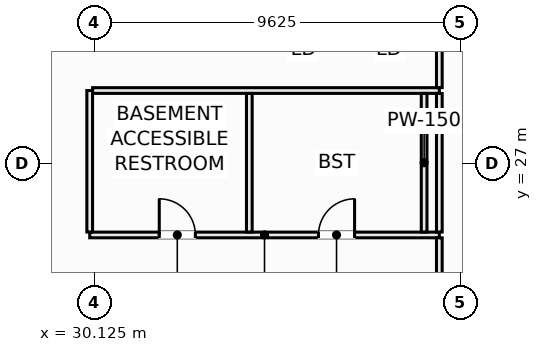
"""IFC4 building model, lengths in metres.
Left out: names, types, materials, properties, quantities, classifications, styles, units other than length and angle.
Written with IfcOpenShell. Run it as: python <this file> out.ifc"""

import sys

from ifc_helpers import new_model, si_unit, direction, frame, frame_2d, origin, place, context, subcontext, project, spatial, rectangle, extrude, element, fill, save


model = new_model("IFC4")
c1 = context("Model", 3, precision=1e-05, world=origin(), true_north=direction((0.0, 1.0)))
c2 = subcontext(c1, "Body", "Model", "MODEL_VIEW")
j1 = project(units=[si_unit("LENGTHUNIT", "METRE"), si_unit("PLANEANGLEUNIT", "RADIAN")], contexts=[c1])
p1 = place(None, origin())
s1 = spatial("IfcSite", under=j1, at=p1, CompositionType="ELEMENT")
p2 = place(p1, origin())
s2 = spatial("IfcBuilding", under=s1, at=p2, CompositionType="ELEMENT")
p3 = place(p2, frame((0.0, 0.0, -4.5)))
s3 = spatial("IfcBuildingStorey", under=s2, at=p3, CompositionType="ELEMENT", Elevation=-4.5)
p4 = place(p3, frame((30.0, 25.12, 0.0), z_axis=(0.0, 0.0, 1.0), x_axis=(1.0, 0.0, 0.0)))
e1 = element("IfcWall", 1, at=p4, inside=s3, PredefinedType="PARTITIONING", context=c2, shape_type="SweptSolid", body=[
    extrude(rectangle(XDim=9.2, YDim=0.15, at=frame_2d((4.6, 0.0))), origin(), (0.0, 0.0, 1.0), 4.14),
])
p5 = place(p4, frame((1.83, 0.0, 0.0)))
e2 = element("IfcOpeningElement", 2, at=p5, cuts=e1, PredefinedType="OPENING", context=c2, shape_type="SweptSolid", body=[
    extrude(rectangle(XDim=0.95, YDim=2.1, at=frame_2d((0.475, 1.05))), frame((0.0, 0.085, 0.0), z_axis=(0.0, -1.0, 0.0), x_axis=(1.0, 0.0, 0.0)), (0.0, 0.0, 1.0), 0.17),
])
p6 = place(p4, frame((6.02, 0.0, 0.0)))
e3 = element("IfcOpeningElement", 3, at=p6, cuts=e1, PredefinedType="OPENING", context=c2, shape_type="SweptSolid", body=[
    extrude(rectangle(XDim=0.95, YDim=2.1, at=frame_2d((0.475, 1.05))), frame((0.0, 0.085, 0.0), z_axis=(0.0, -1.0, 0.0), x_axis=(1.0, 0.0, 0.0)), (0.0, 0.0, 1.0), 0.17),
])
p7 = place(p3, frame((30.0, 25.197, 0.0), z_axis=(0.0, 0.0, 1.0), x_axis=(0.0, 1.0, 0.0)))
e4 = element("IfcWall", 4, at=p7, inside=s3, PredefinedType="PARTITIONING", context=c2, shape_type="SweptSolid", body=[
    extrude(rectangle(XDim=3.723, YDim=0.15, at=frame_2d((1.861, 0.0))), origin(), (0.0, 0.0, 1.0), 4.14),
])
p8 = place(p3, frame((30.077, 28.92, 0.0), z_axis=(0.0, 0.0, 1.0), x_axis=(1.0, 0.0, 0.0)))
e5 = element("IfcWall", 5, at=p8, inside=s3, PredefinedType="PARTITIONING", context=c2, shape_type="SweptSolid", body=[
    extrude(rectangle(XDim=9.123, YDim=0.15, at=frame_2d((4.562, 0.0))), origin(), (0.0, 0.0, 1.0), 4.14),
])
for number, where, z_axis, x_axis in (
    (6, (34.2, 25.197, 0.0), (0.0, 0.0, 1.0), (0.0, 1.0, 0.0)),
    (7, (38.8, 25.197, 0.0), (0.0, 0.0, 1.0), (0.0, 1.0, 0.0)),
):
    element("IfcWall", number, at=place(p3, frame(where, z_axis=z_axis, x_axis=x_axis)), inside=s3, PredefinedType="PARTITIONING", context=c2, shape_type="SweptSolid", body=[
        extrude(rectangle(XDim=3.646, YDim=0.15, at=frame_2d((1.823, 0.0))), origin(), (0.0, 0.0, 1.0), 4.14),
    ])
p9 = place(p3, frame((39.2, 3.2, 0.0), z_axis=(0.0, 0.0, 1.0), x_axis=(0.0, 1.0, 0.0)))
e8 = element("IfcWall", 8, at=p9, inside=s3, PredefinedType="PARTITIONING", context=c2, shape_type="SweptSolid", body=[
    extrude(rectangle(XDim=21.843, YDim=0.15, at=frame_2d((10.921, 0.0))), origin(), (0.0, 0.0, 1.0), 3.374),
])
p10 = place(p3, frame((39.2, 25.197, 0.0), z_axis=(0.0, 0.0, 1.0), x_axis=(0.0, 1.0, 0.0)))
e9 = element("IfcWall", 9, at=p10, inside=s3, PredefinedType="PARTITIONING", context=c2, shape_type="SweptSolid", body=[
    extrude(rectangle(XDim=3.646, YDim=0.15, at=frame_2d((1.823, 0.0))), origin(), (0.0, 0.0, 1.0), 4.14),
])
p11 = place(p3, frame((39.2, 28.997, 0.0), z_axis=(0.0, 0.0, 1.0), x_axis=(0.0, 1.0, 0.0)))
e10 = element("IfcWall", 10, at=p11, inside=s3, PredefinedType="PARTITIONING", context=c2, shape_type="SweptSolid", body=[
    extrude(rectangle(XDim=15.126, YDim=0.15, at=frame_2d((7.563, 0.0))), origin(), (0.0, 0.0, 1.0), 3.374),
])
p12 = place(p11, frame((8.983, 0.0, 0.0)))
e11 = element("IfcOpeningElement", 11, at=p12, cuts=e10, PredefinedType="OPENING", context=c2, shape_type="SweptSolid", body=[
    extrude(rectangle(XDim=0.95, YDim=2.1, at=frame_2d((0.475, 1.05))), frame((0.0, 0.085, 0.0), z_axis=(0.0, -1.0, 0.0), x_axis=(1.0, 0.0, 0.0)), (0.0, 0.0, 1.0), 0.17),
])
p13 = place(p5, origin())
e12 = element("IfcDoor", 12, at=p13, inside=s3, OperationType="SINGLE_SWING_LEFT", PredefinedType="DOOR", context=c2, shape_type="SweptSolid", body=[
    extrude(rectangle(XDim=0.95, YDim=2.1, at=frame_2d((0.475, 1.05))), frame((0.0, 0.025, 0.0), z_axis=(0.0, -1.0, 0.0), x_axis=(1.0, 0.0, 0.0)), (0.0, 0.0, 1.0), 0.05),
])
fill(e2, e12)
p14 = place(p6, origin())
e13 = element("IfcDoor", 13, at=p14, inside=s3, OperationType="SINGLE_SWING_RIGHT", PredefinedType="DOOR", context=c2, shape_type="SweptSolid", body=[
    extrude(rectangle(XDim=0.95, YDim=2.1, at=frame_2d((0.475, 1.05))), frame((0.0, 0.025, 0.0), z_axis=(0.0, -1.0, 0.0), x_axis=(1.0, 0.0, 0.0)), (0.0, 0.0, 1.0), 0.05),
])
fill(e3, e13)
save(model, sys.argv[1])
